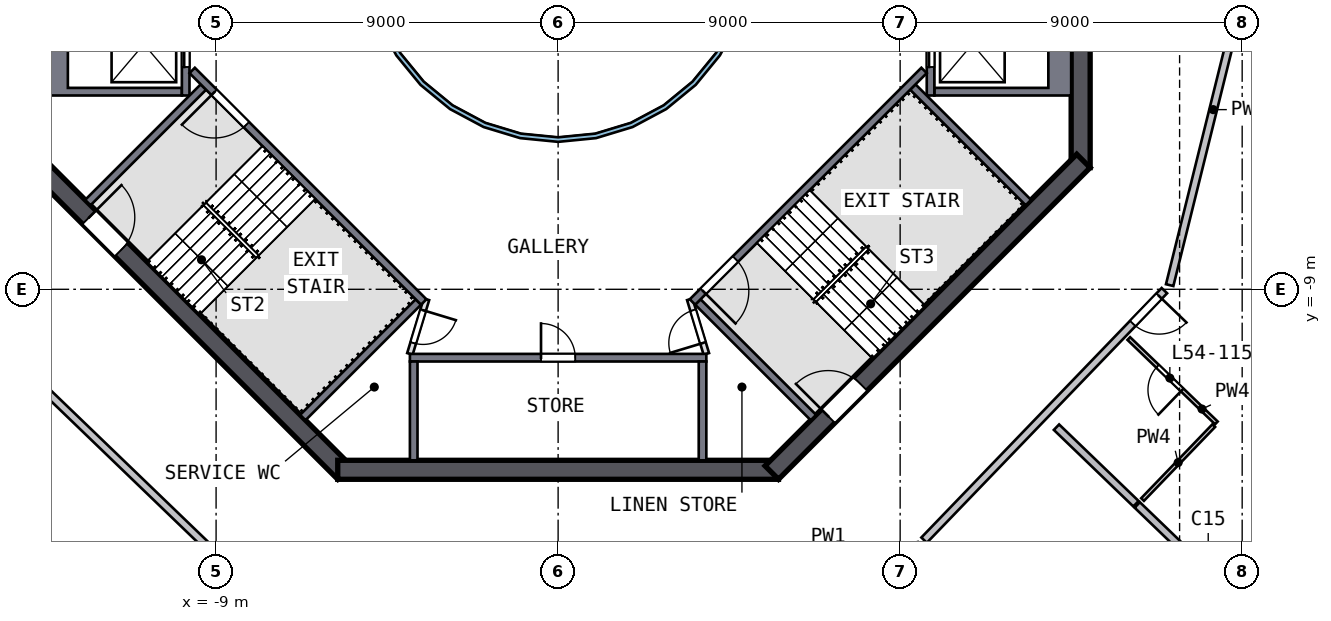
"""IFC4 building model, lengths in metres.
Left out: names, types, materials, properties, quantities, classifications, styles, units other than length and angle.
Written with IfcOpenShell. Run it as: python <this file> out.ifc"""

import sys

from ifc_helpers import new_model, si_unit, direction, frame, frame_2d, origin, origin_2d, place, context, subcontext, project, spatial, polyline, rectangle, outline, extrude, element, fill, save


model = new_model("IFC4")
c1 = context("Model", 3, precision=1e-05, world=origin(), true_north=direction((0.0, 1.0)))
c2 = subcontext(c1, "Body", "Model", "MODEL_VIEW")
j1 = project(units=[si_unit("LENGTHUNIT", "METRE"), si_unit("PLANEANGLEUNIT", "RADIAN")], contexts=[c1])
p1 = place(None, origin())
s1 = spatial("IfcSite", under=j1, at=p1, CompositionType="ELEMENT")
p2 = place(p1, origin())
s2 = spatial("IfcBuilding", under=s1, at=p2, CompositionType="ELEMENT")
p3 = place(p2, frame((0.0, 0.0, 222.0)))
s3 = spatial("IfcBuildingStorey", under=s2, at=p3, CompositionType="ELEMENT", Elevation=222.0)
p4 = place(p3, frame((17.041, -16.411, 0.0), z_axis=(0.054384122, 0.05739393, 0.996869251), x_axis=(0.691739947, 0.717805399, -0.079064874)))
e1 = element("IfcColumn", 1, at=p4, inside=s3, PredefinedType="COLUMN", context=c2, shape_type="SweptSolid", body=[
    extrude(rectangle(XDim=0.8, YDim=0.8, at=origin_2d()), origin(), (0.0, 0.0, 1.0), 4.705),
])
p5 = place(p3, frame((13.75, -5.799, 0.0), z_axis=(0.0, 0.0, 1.0), x_axis=(0.0, 1.0, 0.0)))
e2 = element("IfcWall", 2, at=p5, inside=s3, PredefinedType="SHEAR", context=c2, shape_type="SweptSolid", body=[
    extrude(rectangle(XDim=11.598, YDim=0.5, at=frame_2d((5.799, 0.0))), origin(), (0.0, 0.0, 1.0), 5.0),
])
p6 = place(p5, frame((4.899, 0.0, 0.0)))
e3 = element("IfcOpeningElement", 3, at=p6, cuts=e2, PredefinedType="OPENING", context=c2, shape_type="SweptSolid", body=[
    extrude(rectangle(XDim=1.8, YDim=2.1, at=frame_2d((0.9, 1.05))), frame((0.0, 0.26, 0.0), z_axis=(0.0, -1.0, 0.0), x_axis=(1.0, 0.0, 0.0)), (0.0, 0.0, 1.0), 0.52),
])
p7 = place(p3, frame((-13.823, -5.622, 0.0), z_axis=(0.0, 0.0, 1.0), x_axis=(0.707106781, -0.707106781, 0.0)))
e4 = element("IfcWall", 4, at=p7, inside=s3, PredefinedType="SHEAR", context=c2, shape_type="SweptSolid", body=[
    extrude(rectangle(XDim=11.598, YDim=0.5, at=frame_2d((5.799, 0.0))), origin(), (0.0, 0.0, 1.0), 5.0),
])
p8 = place(p7, frame((2.099, 0.0, 0.0)))
e5 = element("IfcOpeningElement", 5, at=p8, cuts=e4, PredefinedType="OPENING", context=c2, shape_type="SweptSolid", body=[
    extrude(rectangle(XDim=1.2, YDim=2.1, at=frame_2d((0.6, 1.05))), frame((0.0, 0.26, 0.0), z_axis=(0.0, -1.0, 0.0), x_axis=(1.0, 0.0, 0.0)), (0.0, 0.0, 1.0), 0.52),
])
p9 = place(p3, frame((-5.799, -13.75, 0.0), z_axis=(0.0, 0.0, 1.0), x_axis=(1.0, 0.0, 0.0)))
e6 = element("IfcWall", 6, at=p9, inside=s3, PredefinedType="SHEAR", context=c2, shape_type="SweptSolid", body=[
    extrude(rectangle(XDim=11.598, YDim=0.5, at=frame_2d((5.799, 0.0))), origin(), (0.0, 0.0, 1.0), 5.0),
])
p10 = place(p3, frame((5.622, -13.823, 0.0), z_axis=(0.0, 0.0, 1.0), x_axis=(0.707106781, 0.707106781, 0.0)))
e7 = element("IfcWall", 7, at=p10, inside=s3, PredefinedType="SHEAR", context=c2, shape_type="SweptSolid", body=[
    extrude(rectangle(XDim=11.598, YDim=0.5, at=frame_2d((5.799, 0.0))), origin(), (0.0, 0.0, 1.0), 5.0),
])
p11 = place(p10, frame((2.099, 0.0, 0.0)))
e8 = element("IfcOpeningElement", 8, at=p11, cuts=e7, PredefinedType="OPENING", context=c2, shape_type="SweptSolid", body=[
    extrude(rectangle(XDim=1.2, YDim=2.1, at=frame_2d((0.6, 1.05))), frame((0.0, 0.26, 0.0), z_axis=(0.0, -1.0, 0.0), x_axis=(1.0, 0.0, 0.0)), (0.0, 0.0, 1.0), 0.52),
])
p12 = place(p3, origin())
e9 = element("IfcWall", 9, at=p12, inside=s3, PredefinedType="SOLIDWALL", context=c2, shape_type="SweptSolid", body=[
    extrude(outline(polyline([(13.5, -3.9), (9.9, -3.9), (9.9, -3.7), (12.9, -3.7), (12.9, -1.4), (9.9, -1.4), (9.9, -1.2), (13.5, -1.2), (13.5, -3.9)])), origin(), (0.0, 0.0, 1.0), 4.69),
])
p13 = place(p3, frame((9.8, -1.2, 0.0), z_axis=(0.0, 0.0, 1.0), x_axis=(0.0, -1.0, 0.0)))
e10 = element("IfcWall", 10, at=p13, inside=s3, PredefinedType="SOLIDWALL", context=c2, shape_type="SweptSolid", body=[
    extrude(rectangle(XDim=2.7, YDim=0.2, at=frame_2d((1.35, 0.0))), origin(), (0.0, 0.0, 1.0), 4.69),
])
p14 = place(p13, frame((0.75, 0.0, 0.0)))
e11 = element("IfcOpeningElement", 11, at=p14, cuts=e10, PredefinedType="OPENING", context=c2, shape_type="SweptSolid", body=[
    extrude(rectangle(XDim=1.2, YDim=2.1, at=frame_2d((0.6, 1.05))), frame((0.0, 0.11, 0.0), z_axis=(0.0, -1.0, 0.0), x_axis=(1.0, 0.0, 0.0)), (0.0, 0.0, 1.0), 0.22),
])
p15 = place(p3, origin())
e12 = element("IfcWall", 12, at=p15, inside=s3, PredefinedType="SOLIDWALL", context=c2, shape_type="SweptSolid", body=[
    extrude(outline(polyline([(-13.5, -3.9), (-13.5, -1.2), (-9.9, -1.2), (-9.9, -1.4), (-12.9, -1.4), (-12.9, -3.7), (-9.9, -3.7), (-9.9, -3.9), (-13.5, -3.9)])), origin(), (0.0, 0.0, 1.0), 4.69),
])
p16 = place(p3, frame((-9.8, -1.2, 0.0), z_axis=(0.0, 0.0, 1.0), x_axis=(0.0, -1.0, 0.0)))
e13 = element("IfcWall", 13, at=p16, inside=s3, PredefinedType="SOLIDWALL", context=c2, shape_type="SweptSolid", body=[
    extrude(rectangle(XDim=2.7, YDim=0.2, at=frame_2d((1.35, 0.0))), origin(), (0.0, 0.0, 1.0), 4.69),
])
p17 = place(p16, frame((0.75, 0.0, 0.0)))
e14 = element("IfcOpeningElement", 14, at=p17, cuts=e13, PredefinedType="OPENING", context=c2, shape_type="SweptSolid", body=[
    extrude(rectangle(XDim=1.2, YDim=2.1, at=frame_2d((0.6, 1.05))), frame((0.0, 0.11, 0.0), z_axis=(0.0, -1.0, 0.0), x_axis=(1.0, 0.0, 0.0)), (0.0, 0.0, 1.0), 0.22),
])
p18 = place(p3, frame((-3.9, -10.8, 0.0), z_axis=(0.0, 0.0, 1.0), x_axis=(1.0, 0.0, 0.0)))
e15 = element("IfcWall", 15, at=p18, inside=s3, PredefinedType="SOLIDWALL", context=c2, shape_type="SweptSolid", body=[
    extrude(rectangle(XDim=7.8, YDim=0.2, at=frame_2d((3.9, 0.0))), origin(), (0.0, 0.0, 1.0), 4.69),
])
p19 = place(p18, frame((3.45, 0.0, 0.0)))
e16 = element("IfcOpeningElement", 16, at=p19, cuts=e15, PredefinedType="OPENING", context=c2, shape_type="SweptSolid", body=[
    extrude(rectangle(XDim=0.9, YDim=2.1, at=frame_2d((0.45, 1.05))), frame((0.0, 0.11, 0.0), z_axis=(0.0, -1.0, 0.0), x_axis=(1.0, 0.0, 0.0)), (0.0, 0.0, 1.0), 0.22),
])
for number, where, z_axis, x_axis in (
    (17, (-3.8, -10.9, 0.0), (0.0, 0.0, 1.0), (0.0, -1.0, 0.0)),
    (18, (3.8, -10.9, 0.0), (0.0, 0.0, 1.0), (0.0, -1.0, 0.0)),
):
    element("IfcWall", number, at=place(p3, frame(where, z_axis=z_axis, x_axis=x_axis)), inside=s3, PredefinedType="SOLIDWALL", context=c2, shape_type="SweptSolid", body=[
        extrude(rectangle(XDim=2.6, YDim=0.2, at=frame_2d((1.3, 0.0))), origin(), (0.0, 0.0, 1.0), 4.69),
    ])
p20 = place(p3, frame((-3.535, -9.334, 0.0), z_axis=(0.0, 0.0, 1.0), x_axis=(-0.707120946, 0.707092617, 0.0)))
e19 = element("IfcWall", 19, at=p20, inside=s3, PredefinedType="SOLIDWALL", context=c2, shape_type="SweptSolid", body=[
    extrude(rectangle(XDim=8.618, YDim=0.2, at=frame_2d((4.309, 0.0))), origin(), (0.0, 0.0, 1.0), 4.69),
])
p21 = place(p20, frame((6.6, 0.0, 0.0)))
e20 = element("IfcOpeningElement", 20, at=p21, cuts=e19, PredefinedType="OPENING", context=c2, shape_type="SweptSolid", body=[
    extrude(rectangle(XDim=1.2, YDim=2.1, at=frame_2d((0.6, 1.05))), frame((0.0, 0.11, 0.0), z_axis=(0.0, -1.0, 0.0), x_axis=(1.0, 0.0, 0.0)), (0.0, 0.0, 1.0), 0.22),
])
for number, where, z_axis, x_axis in (
    (21, (-9.334, -3.677, 0.0), (0.0, 0.0, 1.0), (-0.707, -0.707, 0.0)),
    (22, (-3.677, -9.334, 0.0), (0.0, 0.0, 1.0), (-0.707, -0.707, 0.0)),
):
    element("IfcWall", number, at=place(p3, frame(where, z_axis=z_axis, x_axis=x_axis)), inside=s3, PredefinedType="SOLIDWALL", context=c2, shape_type="SweptSolid", body=[
        extrude(rectangle(XDim=4.3, YDim=0.2, at=frame_2d((2.15, 0.0))), origin(), (0.0, 0.0, 1.0), 4.69),
    ])
p22 = place(p3, frame((9.629, -3.24, 0.0), z_axis=(0.0, 0.0, 1.0), x_axis=(-0.707120946, -0.707092617, 0.0)))
e23 = element("IfcWall", 23, at=p22, inside=s3, PredefinedType="SOLIDWALL", context=c2, shape_type="SweptSolid", body=[
    extrude(rectangle(XDim=8.618, YDim=0.2, at=frame_2d((4.309, 0.0))), origin(), (0.0, 0.0, 1.0), 4.69),
])
p23 = place(p22, frame((7.018, 0.0, 0.0)))
e24 = element("IfcOpeningElement", 24, at=p23, cuts=e23, PredefinedType="OPENING", context=c2, shape_type="SweptSolid", body=[
    extrude(rectangle(XDim=1.2, YDim=2.1, at=frame_2d((0.6, 1.05))), frame((0.0, 0.11, 0.0), z_axis=(0.0, -1.0, 0.0), x_axis=(1.0, 0.0, 0.0)), (0.0, 0.0, 1.0), 0.22),
])
for number, where, z_axis, x_axis in (
    (25, (3.677, -9.334, 0.0), (0.0, 0.0, 1.0), (0.707, -0.707, 0.0)),
    (26, (9.334, -3.677, 0.0), (0.0, 0.0, 1.0), (0.707, -0.707, 0.0)),
):
    element("IfcWall", number, at=place(p3, frame(where, z_axis=z_axis, x_axis=x_axis)), inside=s3, PredefinedType="SOLIDWALL", context=c2, shape_type="SweptSolid", body=[
        extrude(rectangle(XDim=4.3, YDim=0.2, at=frame_2d((2.15, 0.0))), origin(), (0.0, 0.0, 1.0), 4.69),
    ])
p24 = place(p3, frame((-3.465, -9.263, 0.0), z_axis=(0.0, 0.0, 1.0), x_axis=(-0.289808785, -0.957084567, 0.0)))
e27 = element("IfcWall", 27, at=p24, inside=s3, PredefinedType="PARTITIONING", context=c2, shape_type="SweptSolid", body=[
    extrude(rectangle(XDim=1.501, YDim=0.15, at=frame_2d((0.75, 0.0))), origin(), (0.0, 0.0, 1.0), 4.69),
])
p25 = place(p24, frame((0.301, 0.0, 0.0)))
e28 = element("IfcOpeningElement", 28, at=p25, cuts=e27, PredefinedType="OPENING", context=c2, shape_type="SweptSolid", body=[
    extrude(rectangle(XDim=0.9, YDim=2.1, at=frame_2d((0.45, 1.05))), frame((0.0, 0.085, 0.0), z_axis=(0.0, -1.0, 0.0), x_axis=(1.0, 0.0, 0.0)), (0.0, 0.0, 1.0), 0.17),
])
p26 = place(p3, frame((3.9, -10.7, 0.0), z_axis=(0.0, 0.0, 1.0), x_axis=(-0.289808785, 0.957084567, 0.0)))
e29 = element("IfcWall", 29, at=p26, inside=s3, PredefinedType="PARTITIONING", context=c2, shape_type="SweptSolid", body=[
    extrude(rectangle(XDim=1.501, YDim=0.15, at=frame_2d((0.75, 0.0))), origin(), (0.0, 0.0, 1.0), 4.69),
])
p27 = place(p26, frame((0.301, 0.0, 0.0)))
e30 = element("IfcOpeningElement", 30, at=p27, cuts=e29, PredefinedType="OPENING", context=c2, shape_type="SweptSolid", body=[
    extrude(rectangle(XDim=0.9, YDim=2.1, at=frame_2d((0.45, 1.05))), frame((0.0, 0.085, 0.0), z_axis=(0.0, -1.0, 0.0), x_axis=(1.0, 0.0, 0.0)), (0.0, 0.0, 1.0), 0.17),
])
p28 = place(p3, origin())
e31 = element("IfcWall", 31, at=p28, inside=s3, PredefinedType="SOLIDWALL", context=c2, shape_type="SweptSolid", body=[
    extrude(outline(polyline([(5.021, -0.999), (4.73, -1.959), (4.257, -2.844), (3.62, -3.62), (2.844, -4.257), (1.959, -4.73), (0.999, -5.021), (0.0, -5.12), (-0.999, -5.021), (-1.959, -4.73), (-2.844, -4.257), (-3.62, -3.62), (-4.257, -2.844), (-4.73, -1.959), (-5.021, -0.999), (-5.12, 0.0), (-5.021, 0.999), (-4.73, 1.959), (-4.257, 2.844), (-3.62, 3.62), (-2.844, 4.257), (-1.959, 4.73), (-0.999, 5.021), (0.0, 5.12), (0.999, 5.021), (1.959, 4.73), (2.844, 4.257), (3.62, 3.62), (4.257, 2.844), (4.73, 1.959), (5.021, 0.999), (5.12, 0.0), (5.021, -0.999)]), holes=[polyline([(4.904, 0.976), (4.619, 1.913), (4.157, 2.778), (3.535, 3.535), (2.778, 4.157), (1.913, 4.619), (0.976, 4.904), (0.0, 5.0), (-0.976, 4.904), (-1.913, 4.619), (-2.778, 4.157), (-3.535, 3.535), (-4.157, 2.778), (-4.619, 1.913), (-4.904, 0.976), (-5.0, 0.0), (-4.904, -0.976), (-4.619, -1.913), (-4.157, -2.778), (-3.535, -3.535), (-2.778, -4.157), (-1.913, -4.619), (-0.976, -4.904), (0.0, -5.0), (0.976, -4.904), (1.913, -4.619), (2.778, -4.157), (3.535, -3.535), (4.157, -2.778), (4.619, -1.913), (4.904, -0.976), (5.0, 0.0), (4.904, 0.976)])]), origin(), (0.0, 0.0, 1.0), 4.69),
])
p29 = place(p3, frame((-15.745, -9.491, 0.0), z_axis=(0.0, 0.0, 1.0), x_axis=(0.720309294, -0.693653027, 0.0)))
e32 = element("IfcWall", 32, at=p29, inside=s3, PredefinedType="SOLIDWALL", context=c2, shape_type="SweptSolid", body=[
    extrude(rectangle(XDim=9.516, YDim=0.2, at=frame_2d((4.758, 0.0))), origin(), (0.0, 0.0, 1.0), 4.69),
])
p30 = place(p3, frame((15.953, -9.035, 0.0), z_axis=(0.0, 0.0, 1.0), x_axis=(-0.693656613, -0.72030584, 0.0)))
e33 = element("IfcWall", 33, at=p30, inside=s3, PredefinedType="SOLIDWALL", context=c2, shape_type="SweptSolid", body=[
    extrude(rectangle(XDim=9.115, YDim=0.2, at=frame_2d((4.558, 0.0))), origin(), (0.0, 0.0, 1.0), 4.69),
])
p31 = place(p30, frame((0.2, 0.0, 0.0)))
e34 = element("IfcOpeningElement", 34, at=p31, cuts=e33, PredefinedType="OPENING", context=c2, shape_type="SweptSolid", body=[
    extrude(rectangle(XDim=1.0, YDim=2.1, at=frame_2d((0.5, 1.05))), frame((0.0, 0.11, 0.0), z_axis=(0.0, -1.0, 0.0), x_axis=(1.0, 0.0, 0.0)), (0.0, 0.0, 1.0), 0.22),
])
p32 = place(p3, frame((16.092, -8.89, 0.0), z_axis=(0.0, 0.0, 1.0), x_axis=(0.240573225, 0.970630992, 0.0)))
e35 = element("IfcWall", 35, at=p32, inside=s3, PredefinedType="SOLIDWALL", context=c2, shape_type="SweptSolid", body=[
    extrude(rectangle(XDim=9.516, YDim=0.2, at=frame_2d((4.758, 0.0))), origin(), (0.0, 0.0, 1.0), 4.69),
])
p33 = place(p3, frame((13.114, -12.628, 0.0), z_axis=(0.0, 0.0, 1.0), x_axis=(0.720303104, -0.693659454, 0.0)))
e36 = element("IfcWall", 36, at=p33, inside=s3, PredefinedType="SOLIDWALL", context=c2, shape_type="SweptSolid", body=[
    extrude(rectangle(XDim=2.905, YDim=0.2, at=frame_2d((1.452, 0.0))), origin(), (0.0, 0.0, 1.0), 4.69),
])
p34 = place(p3, frame((15.239, -14.675, 0.0), z_axis=(0.0, 0.0, 1.0), x_axis=(0.72032167, -0.693640175, 0.0)))
e37 = element("IfcWall", 37, at=p34, inside=s3, PredefinedType="SOLIDWALL", context=c2, shape_type="SweptSolid", body=[
    extrude(rectangle(XDim=3.102, YDim=0.2, at=frame_2d((1.551, 0.0))), origin(), (0.0, 0.0, 1.0), 4.69),
])
p35 = place(p3, frame((17.322, -12.516, 0.0), z_axis=(0.0, 0.0, 1.0), x_axis=(-0.7202948, 0.693668077, 0.0)))
e38 = element("IfcWall", 38, at=p35, inside=s3, PredefinedType="PARTITIONING", context=c2, shape_type="SweptSolid", body=[
    extrude(rectangle(XDim=3.2, YDim=0.1, at=frame_2d((1.6, 0.0))), origin(), (0.0, 0.0, 1.0), 4.69),
])
p36 = place(p35, frame((1.25, 0.0, 0.0)))
e39 = element("IfcOpeningElement", 39, at=p36, cuts=e38, PredefinedType="OPENING", context=c2, shape_type="SweptSolid", body=[
    extrude(rectangle(XDim=0.9, YDim=2.1, at=frame_2d((0.45, 1.05))), frame((0.0, 0.06, 0.0), z_axis=(0.0, -1.0, 0.0), x_axis=(1.0, 0.0, 0.0)), (0.0, 0.0, 1.0), 0.12),
])
p37 = place(p3, frame((17.252, -12.588, 0.0), z_axis=(0.0, 0.0, 1.0), x_axis=(-0.693643425, -0.72031854, 0.0)))
e40 = element("IfcWall", 40, at=p37, inside=s3, PredefinedType="PARTITIONING", context=c2, shape_type="SweptSolid", body=[
    extrude(rectangle(XDim=2.7, YDim=0.1, at=frame_2d((1.35, 0.0))), origin(), (0.0, 0.0, 1.0), 4.69),
])
p38 = place(p19, origin())
e41 = element("IfcDoor", 41, at=p38, inside=s3, OperationType="SINGLE_SWING_LEFT", PredefinedType="DOOR", context=c2, shape_type="SweptSolid", body=[
    extrude(rectangle(XDim=0.9, YDim=2.1, at=frame_2d((0.45, 1.05))), frame((0.0, 0.025, 0.0), z_axis=(0.0, -1.0, 0.0), x_axis=(1.0, 0.0, 0.0)), (0.0, 0.0, 1.0), 0.05),
])
fill(e16, e41)
p39 = place(p14, origin())
e42 = element("IfcDoor", 42, at=p39, inside=s3, OperationType="DOUBLE_DOOR_SLIDING", PredefinedType="DOOR", context=c2, shape_type="SweptSolid", body=[
    extrude(rectangle(XDim=1.2, YDim=2.1, at=frame_2d((0.6, 1.05))), frame((0.0, 0.025, 0.0), z_axis=(0.0, -1.0, 0.0), x_axis=(1.0, 0.0, 0.0)), (0.0, 0.0, 1.0), 0.05),
])
fill(e11, e42)
p40 = place(p17, origin())
e43 = element("IfcDoor", 43, at=p40, inside=s3, OperationType="DOUBLE_DOOR_SLIDING", PredefinedType="DOOR", context=c2, shape_type="SweptSolid", body=[
    extrude(rectangle(XDim=1.2, YDim=2.1, at=frame_2d((0.6, 1.05))), frame((0.0, 0.025, 0.0), z_axis=(0.0, -1.0, 0.0), x_axis=(1.0, 0.0, 0.0)), (0.0, 0.0, 1.0), 0.05),
])
fill(e14, e43)
p41 = place(p21, origin())
e44 = element("IfcDoor", 44, at=p41, inside=s3, OperationType="SINGLE_SWING_RIGHT", PredefinedType="DOOR", context=c2, shape_type="SweptSolid", body=[
    extrude(rectangle(XDim=1.2, YDim=2.1, at=frame_2d((0.6, 1.05))), frame((0.0, 0.025, 0.0), z_axis=(0.0, -1.0, 0.0), x_axis=(1.0, 0.0, 0.0)), (0.0, 0.0, 1.0), 0.05),
])
fill(e20, e44)
p42 = place(p23, origin())
e45 = element("IfcDoor", 45, at=p42, inside=s3, OperationType="SINGLE_SWING_RIGHT", PredefinedType="DOOR", context=c2, shape_type="SweptSolid", body=[
    extrude(rectangle(XDim=1.2, YDim=2.1, at=frame_2d((0.6, 1.05))), frame((0.0, 0.025, 0.0), z_axis=(0.0, -1.0, 0.0), x_axis=(1.0, 0.0, 0.0)), (0.0, 0.0, 1.0), 0.05),
])
fill(e24, e45)
p43 = place(p8, origin())
e46 = element("IfcDoor", 46, at=p43, inside=s3, OperationType="SINGLE_SWING_LEFT", PredefinedType="DOOR", context=c2, shape_type="SweptSolid", body=[
    extrude(rectangle(XDim=1.2, YDim=2.1, at=frame_2d((0.6, 1.05))), frame((0.0, 0.025, 0.0), z_axis=(0.0, -1.0, 0.0), x_axis=(1.0, 0.0, 0.0)), (0.0, 0.0, 1.0), 0.05),
])
fill(e5, e46)
p44 = place(p11, origin())
e47 = element("IfcDoor", 47, at=p44, inside=s3, OperationType="SINGLE_SWING_LEFT", PredefinedType="DOOR", context=c2, shape_type="SweptSolid", body=[
    extrude(rectangle(XDim=1.2, YDim=2.1, at=frame_2d((0.6, 1.05))), frame((0.0, 0.025, 0.0), z_axis=(0.0, -1.0, 0.0), x_axis=(1.0, 0.0, 0.0)), (0.0, 0.0, 1.0), 0.05),
])
fill(e8, e47)
p45 = place(p25, origin())
e48 = element("IfcDoor", 48, at=p45, inside=s3, OperationType="SINGLE_SWING_LEFT", PredefinedType="DOOR", context=c2, shape_type="SweptSolid", body=[
    extrude(rectangle(XDim=0.9, YDim=2.1, at=frame_2d((0.45, 1.05))), frame((0.0, 0.025, 0.0), z_axis=(0.0, -1.0, 0.0), x_axis=(1.0, 0.0, 0.0)), (0.0, 0.0, 1.0), 0.05),
])
fill(e28, e48)
p46 = place(p27, origin())
e49 = element("IfcDoor", 49, at=p46, inside=s3, OperationType="SINGLE_SWING_LEFT", PredefinedType="DOOR", context=c2, shape_type="SweptSolid", body=[
    extrude(rectangle(XDim=0.9, YDim=2.1, at=frame_2d((0.45, 1.05))), frame((0.0, 0.025, 0.0), z_axis=(0.0, -1.0, 0.0), x_axis=(1.0, 0.0, 0.0)), (0.0, 0.0, 1.0), 0.05),
])
fill(e30, e49)
p47 = place(p31, origin())
e50 = element("IfcDoor", 50, at=p47, inside=s3, OperationType="SINGLE_SWING_LEFT", PredefinedType="DOOR", context=c2, shape_type="SweptSolid", body=[
    extrude(rectangle(XDim=1.0, YDim=2.1, at=frame_2d((0.5, 1.05))), frame((0.0, 0.025, 0.0), z_axis=(0.0, -1.0, 0.0), x_axis=(1.0, 0.0, 0.0)), (0.0, 0.0, 1.0), 0.05),
])
fill(e34, e50)
p48 = place(p36, origin())
e51 = element("IfcDoor", 51, at=p48, inside=s3, OperationType="SINGLE_SWING_LEFT", PredefinedType="DOOR", context=c2, shape_type="SweptSolid", body=[
    extrude(rectangle(XDim=0.9, YDim=2.1, at=frame_2d((0.45, 1.05))), frame((0.0, 0.025, 0.0), z_axis=(0.0, -1.0, 0.0), x_axis=(1.0, 0.0, 0.0)), (0.0, 0.0, 1.0), 0.05),
])
fill(e39, e51)
save(model, sys.argv[1])
